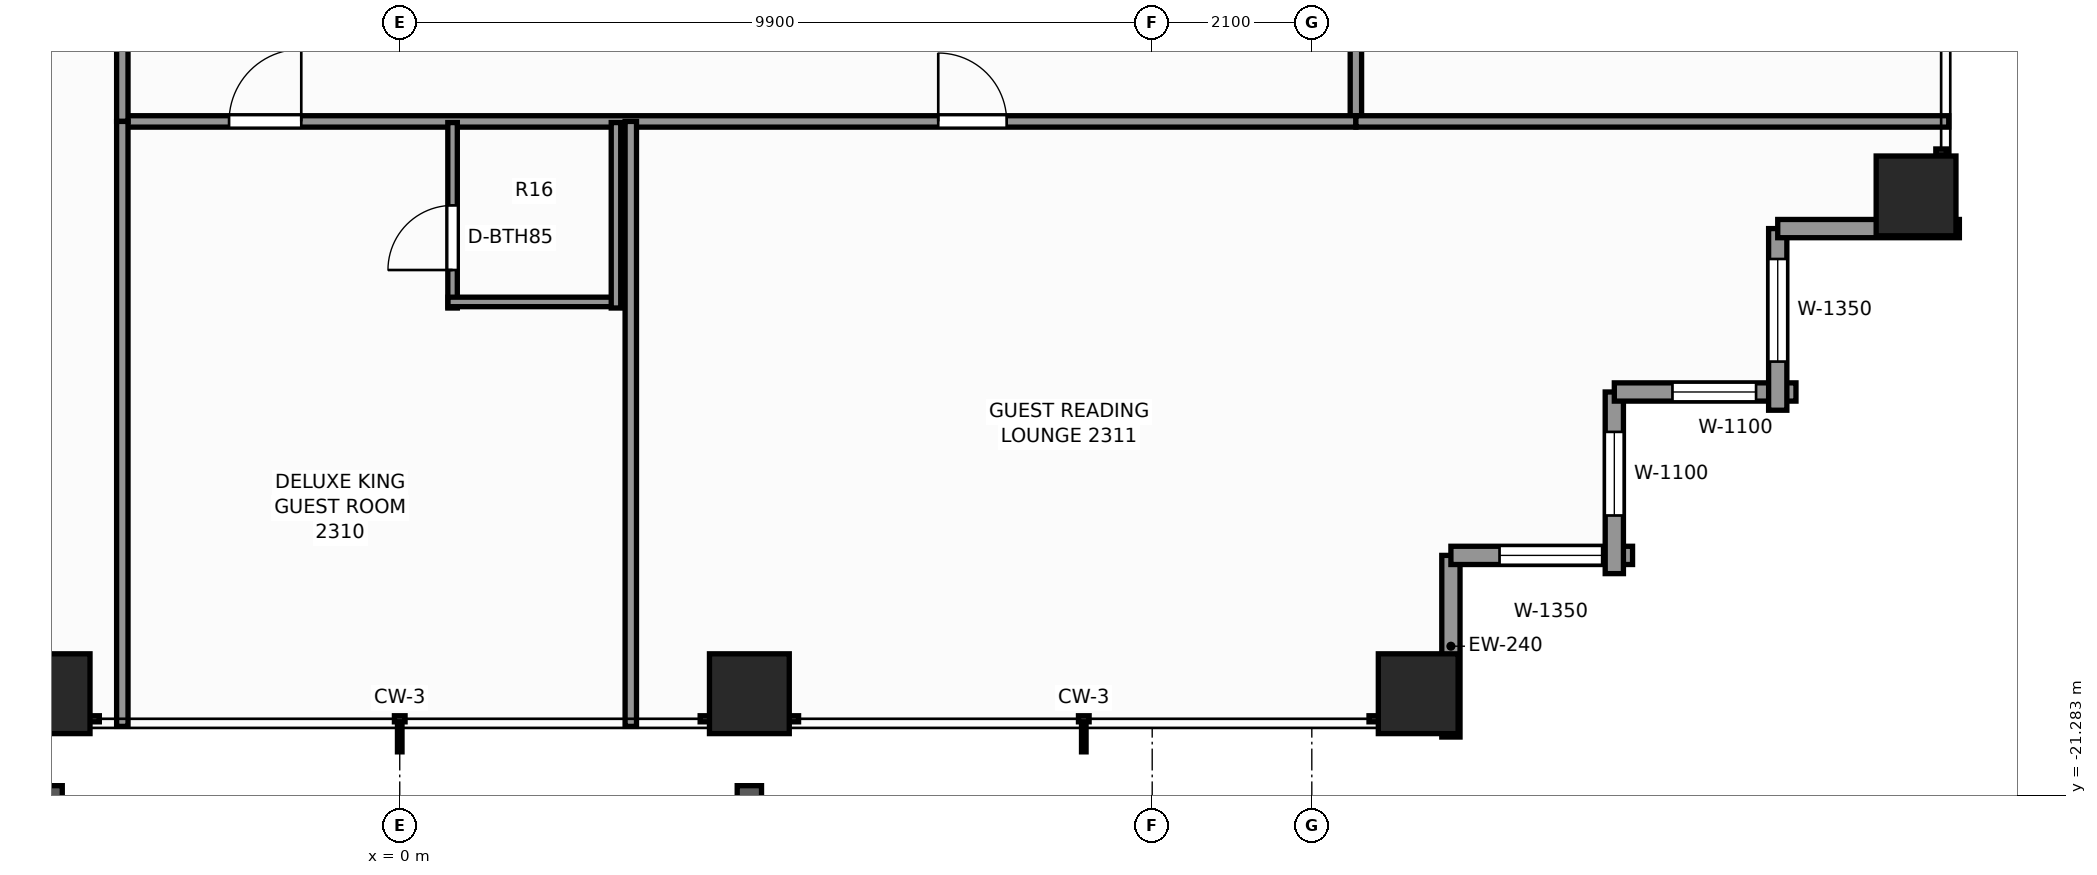
"""IFC4 building model, lengths in metres.
Left out: names, types, materials, properties, quantities, classifications, styles, units other than length and angle.
Written with IfcOpenShell. Run it as: python <this file> out.ifc"""

import sys

from ifc_helpers import new_model, si_unit, direction, frame, frame_2d, origin, origin_2d, place, context, subcontext, project, spatial, rectangle, extrude, element, fill, save


model = new_model("IFC4")
c1 = context("Model", 3, precision=1e-05, world=origin(), true_north=direction((0.0, 1.0)))
c2 = subcontext(c1, "Body", "Model", "MODEL_VIEW")
j1 = project(units=[si_unit("LENGTHUNIT", "METRE"), si_unit("PLANEANGLEUNIT", "RADIAN")], contexts=[c1])
p1 = place(None, origin())
s1 = spatial("IfcSite", under=j1, at=p1, CompositionType="ELEMENT")
p2 = place(p1, origin())
s2 = spatial("IfcBuilding", under=s1, at=p2, CompositionType="ELEMENT")
p3 = place(p2, frame((0.0, 0.0, 82.1)))
s3 = spatial("IfcBuildingStorey", under=s2, at=p3, CompositionType="ELEMENT", Elevation=82.1)
for number, where, z_axis, x_axis in (
    (1, (-4.6, -19.95, 0.0), (0.0, 0.0, 1.0), (1.0, 0.0, 0.0)),
    (2, (4.6, -19.95, 0.0), (0.0, 0.0, 1.0), (1.0, 0.0, 0.0)),
    (3, (13.4, -19.95, 0.0), (0.0, 0.0, 1.0), (1.0, 0.0, 0.0)),
    (4, (19.95, -13.4, 0.0), (0.0, 0.0, 1.0), (1.0, 0.0, 0.0)),
):
    element("IfcColumn", number, at=place(p3, frame(where, z_axis=z_axis, x_axis=x_axis)), inside=s3, PredefinedType="COLUMN", context=c2, shape_type="SweptSolid", body=[
        extrude(rectangle(XDim=1.05, YDim=1.05, at=origin_2d()), origin(), (0.0, 0.0, 1.0), 3.3),
    ])
p4 = place(p3, frame((13.83, -18.13, 0.0), z_axis=(0.0, 0.0, 1.0), x_axis=(0.0, -1.0, 0.0)))
e5 = element("IfcWall", 5, at=p4, inside=s3, PredefinedType="STANDARD", context=c2, shape_type="SweptSolid", body=[
    extrude(rectangle(XDim=2.39, YDim=0.24, at=frame_2d((1.195, 0.0))), origin(), (0.0, 0.0, 1.0), 2.459),
])
p5 = place(p3, frame((16.22, -18.13, 0.0), z_axis=(0.0, 0.0, 1.0), x_axis=(-1.0, 0.0, 0.0)))
e6 = element("IfcWall", 6, at=p5, inside=s3, PredefinedType="STANDARD", context=c2, shape_type="SweptSolid", body=[
    extrude(rectangle(XDim=2.39, YDim=0.24, at=frame_2d((1.195, 0.0))), origin(), (0.0, 0.0, 1.0), 2.459),
])
p6 = place(p5, frame((0.4, 0.0, 0.65)))
e7 = element("IfcOpeningElement", 7, at=p6, cuts=e6, PredefinedType="OPENING", context=c2, shape_type="SweptSolid", body=[
    extrude(rectangle(XDim=1.35, YDim=1.55, at=frame_2d((0.675, 0.775))), frame((0.0, 0.13, 0.0), z_axis=(0.0, -1.0, 0.0), x_axis=(1.0, 0.0, 0.0)), (0.0, 0.0, 1.0), 0.26),
])
p7 = place(p3, frame((15.98, -15.98, 0.0), z_axis=(0.0, 0.0, 1.0), x_axis=(0.0, -1.0, 0.0)))
e8 = element("IfcWall", 8, at=p7, inside=s3, PredefinedType="STANDARD", context=c2, shape_type="SweptSolid", body=[
    extrude(rectangle(XDim=2.39, YDim=0.24, at=frame_2d((1.195, 0.0))), origin(), (0.0, 0.0, 1.0), 2.459),
])
p8 = place(p7, frame((0.525, 0.0, 0.65)))
e9 = element("IfcOpeningElement", 9, at=p8, cuts=e8, PredefinedType="OPENING", context=c2, shape_type="SweptSolid", body=[
    extrude(rectangle(XDim=1.1, YDim=1.45, at=frame_2d((0.55, 0.725))), frame((0.0, 0.13, 0.0), z_axis=(0.0, -1.0, 0.0), x_axis=(1.0, 0.0, 0.0)), (0.0, 0.0, 1.0), 0.26),
])
p9 = place(p3, frame((18.37, -15.98, 0.0), z_axis=(0.0, 0.0, 1.0), x_axis=(-1.0, 0.0, 0.0)))
e10 = element("IfcWall", 10, at=p9, inside=s3, PredefinedType="STANDARD", context=c2, shape_type="SweptSolid", body=[
    extrude(rectangle(XDim=2.39, YDim=0.24, at=frame_2d((1.195, 0.0))), origin(), (0.0, 0.0, 1.0), 2.459),
])
p10 = place(p9, frame((0.525, 0.0, 0.65)))
e11 = element("IfcOpeningElement", 11, at=p10, cuts=e10, PredefinedType="OPENING", context=c2, shape_type="SweptSolid", body=[
    extrude(rectangle(XDim=1.1, YDim=1.45, at=frame_2d((0.55, 0.725))), frame((0.0, 0.13, 0.0), z_axis=(0.0, -1.0, 0.0), x_axis=(1.0, 0.0, 0.0)), (0.0, 0.0, 1.0), 0.26),
])
p11 = place(p3, frame((18.13, -13.83, 0.0), z_axis=(0.0, 0.0, 1.0), x_axis=(0.0, -1.0, 0.0)))
e12 = element("IfcWall", 12, at=p11, inside=s3, PredefinedType="STANDARD", context=c2, shape_type="SweptSolid", body=[
    extrude(rectangle(XDim=2.39, YDim=0.24, at=frame_2d((1.195, 0.0))), origin(), (0.0, 0.0, 1.0), 2.459),
])
p12 = place(p11, frame((0.4, 0.0, 0.65)))
e13 = element("IfcOpeningElement", 13, at=p12, cuts=e12, PredefinedType="OPENING", context=c2, shape_type="SweptSolid", body=[
    extrude(rectangle(XDim=1.35, YDim=1.55, at=frame_2d((0.675, 0.775))), frame((0.0, 0.13, 0.0), z_axis=(0.0, -1.0, 0.0), x_axis=(1.0, 0.0, 0.0)), (0.0, 0.0, 1.0), 0.26),
])
p13 = place(p3, frame((20.52, -13.83, 0.0), z_axis=(0.0, 0.0, 1.0), x_axis=(-1.0, 0.0, 0.0)))
e14 = element("IfcWall", 14, at=p13, inside=s3, PredefinedType="STANDARD", context=c2, shape_type="SweptSolid", body=[
    extrude(rectangle(XDim=2.39, YDim=0.24, at=frame_2d((1.195, 0.0))), origin(), (0.0, 0.0, 1.0), 2.459),
])
p14 = place(p3, frame((12.58, -12.42, 0.0), z_axis=(0.0, 0.0, 1.0), x_axis=(0.0, 1.0, 0.0)))
e15 = element("IfcWall", 15, at=p14, inside=s3, PredefinedType="PARTITIONING", context=c2, shape_type="SweptSolid", body=[
    extrude(rectangle(XDim=24.84, YDim=0.15, at=frame_2d((12.42, 0.0))), origin(), (0.0, 0.0, 1.0), 2.292),
])
p15 = place(p14, frame((4.41, 0.0, 0.0)))
e16 = element("IfcOpeningElement", 16, at=p15, cuts=e15, PredefinedType="OPENING", context=c2, shape_type="SweptSolid", body=[
    extrude(rectangle(XDim=0.95, YDim=2.06, at=frame_2d((0.475, 1.03))), frame((0.0, 0.085, 0.0), z_axis=(0.0, -1.0, 0.0), x_axis=(1.0, 0.0, 0.0)), (0.0, 0.0, 1.0), 0.17),
])
p16 = place(p14, frame((19.505, 0.0, 0.0)))
e17 = element("IfcOpeningElement", 17, at=p16, cuts=e15, PredefinedType="OPENING", context=c2, shape_type="SweptSolid", body=[
    extrude(rectangle(XDim=0.9, YDim=2.06, at=frame_2d((0.45, 1.03))), frame((0.0, 0.085, 0.0), z_axis=(0.0, -1.0, 0.0), x_axis=(1.0, 0.0, 0.0)), (0.0, 0.0, 1.0), 0.17),
])
p17 = place(p3, frame((-3.65, -12.42, 0.0), z_axis=(0.0, 0.0, 1.0), x_axis=(1.0, 0.0, 0.0)))
e18 = element("IfcWall", 18, at=p17, inside=s3, PredefinedType="PARTITIONING", context=c2, shape_type="SweptSolid", body=[
    extrude(rectangle(XDim=16.23, YDim=0.15, at=frame_2d((8.115, 0.0))), origin(), (0.0, 0.0, 1.0), 2.292),
])
p18 = place(p17, frame((1.405, 0.0, 0.0)))
e19 = element("IfcOpeningElement", 19, at=p18, cuts=e18, PredefinedType="OPENING", context=c2, shape_type="SweptSolid", body=[
    extrude(rectangle(XDim=0.95, YDim=2.06, at=frame_2d((0.475, 1.03))), frame((0.0, 0.085, 0.0), z_axis=(0.0, -1.0, 0.0), x_axis=(1.0, 0.0, 0.0)), (0.0, 0.0, 1.0), 0.17),
])
p19 = place(p17, frame((10.735, 0.0, 0.0)))
e20 = element("IfcOpeningElement", 20, at=p19, cuts=e18, PredefinedType="OPENING", context=c2, shape_type="SweptSolid", body=[
    extrude(rectangle(XDim=0.9, YDim=2.06, at=frame_2d((0.45, 1.03))), frame((0.0, 0.085, 0.0), z_axis=(0.0, -1.0, 0.0), x_axis=(1.0, 0.0, 0.0)), (0.0, 0.0, 1.0), 0.17),
])
p20 = place(p3, frame((-3.65, -12.42, 0.0), z_axis=(0.0, 0.0, 1.0), x_axis=(0.0, 1.0, 0.0)))
e21 = element("IfcWall", 21, at=p20, inside=s3, PredefinedType="PARTITIONING", context=c2, shape_type="SweptSolid", body=[
    extrude(rectangle(XDim=2.52, YDim=0.15, at=frame_2d((1.26, 0.0))), origin(), (0.0, 0.0, 1.0), 3.08),
])
p21 = place(p3, frame((12.58, -12.42, 0.0), z_axis=(0.0, 0.0, 1.0), x_axis=(1.0, 0.0, 0.0)))
e22 = element("IfcWall", 22, at=p21, inside=s3, PredefinedType="PARTITIONING", context=c2, shape_type="SweptSolid", body=[
    extrude(rectangle(XDim=7.8, YDim=0.15, at=frame_2d((3.9, 0.0))), origin(), (0.0, 0.0, 1.0), 2.292),
])
p22 = place(p3, frame((-3.65, -20.38, 0.0), z_axis=(0.0, 0.0, 1.0), x_axis=(0.0, 1.0, 0.0)))
e23 = element("IfcWall", 23, at=p22, inside=s3, PredefinedType="PARTITIONING", context=c2, shape_type="SweptSolid", body=[
    extrude(rectangle(XDim=7.96, YDim=0.15, at=frame_2d((3.98, 0.0))), origin(), (0.0, 0.0, 1.0), 2.449),
])
p23 = place(p3, frame((3.04, -20.38, 0.0), z_axis=(0.0, 0.0, 1.0), x_axis=(0.0, 1.0, 0.0)))
e24 = element("IfcWall", 24, at=p23, inside=s3, PredefinedType="PARTITIONING", context=c2, shape_type="SweptSolid", body=[
    extrude(rectangle(XDim=7.96, YDim=0.15, at=frame_2d((3.98, 0.0))), origin(), (0.0, 0.0, 1.0), 2.369),
])
p24 = place(p3, frame((0.695, -14.875, 0.0), z_axis=(0.0, 0.0, 1.0), x_axis=(0.0, 1.0, 0.0)))
e25 = element("IfcWall", 25, at=p24, inside=s3, PredefinedType="PARTITIONING", context=c2, shape_type="SweptSolid", body=[
    extrude(rectangle(XDim=2.44, YDim=0.125, at=frame_2d((1.22, 0.0))), origin(), (0.0, 0.0, 1.0), 3.08),
])
p25 = place(p24, frame((0.5, 0.0, 0.0)))
e26 = element("IfcOpeningElement", 26, at=p25, cuts=e25, PredefinedType="OPENING", context=c2, shape_type="SweptSolid", body=[
    extrude(rectangle(XDim=0.85, YDim=2.03, at=frame_2d((0.425, 1.015))), frame((0.0, 0.073, 0.0), z_axis=(0.0, -1.0, 0.0), x_axis=(1.0, 0.0, 0.0)), (0.0, 0.0, 1.0), 0.145),
])
p26 = place(p3, frame((0.635, -14.795, 0.0), z_axis=(0.0, 0.0, 1.0), x_axis=(1.0, 0.0, 0.0)))
e27 = element("IfcWall", 27, at=p26, inside=s3, PredefinedType="PARTITIONING", context=c2, shape_type="SweptSolid", body=[
    extrude(rectangle(XDim=2.27, YDim=0.125, at=frame_2d((1.135, 0.0))), origin(), (0.0, 0.0, 1.0), 3.08),
])
p27 = place(p3, frame((2.845, -14.875, 0.0), z_axis=(0.0, 0.0, 1.0), x_axis=(0.0, 1.0, 0.0)))
e28 = element("IfcWall", 28, at=p27, inside=s3, PredefinedType="PARTITIONING", context=c2, shape_type="SweptSolid", body=[
    extrude(rectangle(XDim=2.44, YDim=0.125, at=frame_2d((1.22, 0.0))), origin(), (0.0, 0.0, 1.0), 2.369),
])
p28 = place(p6, origin())
e29 = element("IfcWindow", 29, at=p28, inside=s3, PartitioningType="SINGLE_PANEL", PredefinedType="WINDOW", context=c2, shape_type="SweptSolid", body=[
    extrude(rectangle(XDim=1.35, YDim=1.55, at=frame_2d((0.675, 0.775))), frame((0.0, 0.03, 0.0), z_axis=(0.0, -1.0, 0.0), x_axis=(1.0, 0.0, 0.0)), (0.0, 0.0, 1.0), 0.06),
])
fill(e7, e29)
p29 = place(p8, origin())
e30 = element("IfcWindow", 30, at=p29, inside=s3, PartitioningType="SINGLE_PANEL", PredefinedType="WINDOW", context=c2, shape_type="SweptSolid", body=[
    extrude(rectangle(XDim=1.1, YDim=1.45, at=frame_2d((0.55, 0.725))), frame((0.0, 0.03, 0.0), z_axis=(0.0, -1.0, 0.0), x_axis=(1.0, 0.0, 0.0)), (0.0, 0.0, 1.0), 0.06),
])
fill(e9, e30)
p30 = place(p10, origin())
e31 = element("IfcWindow", 31, at=p30, inside=s3, PartitioningType="SINGLE_PANEL", PredefinedType="WINDOW", context=c2, shape_type="SweptSolid", body=[
    extrude(rectangle(XDim=1.1, YDim=1.45, at=frame_2d((0.55, 0.725))), frame((0.0, 0.03, 0.0), z_axis=(0.0, -1.0, 0.0), x_axis=(1.0, 0.0, 0.0)), (0.0, 0.0, 1.0), 0.06),
])
fill(e11, e31)
p31 = place(p12, origin())
e32 = element("IfcWindow", 32, at=p31, inside=s3, PartitioningType="SINGLE_PANEL", PredefinedType="WINDOW", context=c2, shape_type="SweptSolid", body=[
    extrude(rectangle(XDim=1.35, YDim=1.55, at=frame_2d((0.675, 0.775))), frame((0.0, 0.03, 0.0), z_axis=(0.0, -1.0, 0.0), x_axis=(1.0, 0.0, 0.0)), (0.0, 0.0, 1.0), 0.06),
])
fill(e13, e32)
p32 = place(p25, origin())
e33 = element("IfcDoor", 33, at=p32, inside=s3, OperationType="SINGLE_SWING_LEFT", PredefinedType="DOOR", context=c2, shape_type="SweptSolid", body=[
    extrude(rectangle(XDim=0.85, YDim=2.03, at=frame_2d((0.425, 1.015))), frame((0.0, 0.025, 0.0), z_axis=(0.0, -1.0, 0.0), x_axis=(1.0, 0.0, 0.0)), (0.0, 0.0, 1.0), 0.05),
])
fill(e26, e33)
p33 = place(p18, origin())
e34 = element("IfcDoor", 34, at=p33, inside=s3, OperationType="SINGLE_SWING_RIGHT", PredefinedType="DOOR", context=c2, shape_type="SweptSolid", body=[
    extrude(rectangle(XDim=0.95, YDim=2.06, at=frame_2d((0.475, 1.03))), frame((0.0, 0.025, 0.0), z_axis=(0.0, -1.0, 0.0), x_axis=(1.0, 0.0, 0.0)), (0.0, 0.0, 1.0), 0.05),
])
fill(e19, e34)
p34 = place(p19, origin())
e35 = element("IfcDoor", 35, at=p34, inside=s3, OperationType="SINGLE_SWING_LEFT", PredefinedType="DOOR", context=c2, shape_type="SweptSolid", body=[
    extrude(rectangle(XDim=0.9, YDim=2.06, at=frame_2d((0.45, 1.03))), frame((0.0, 0.025, 0.0), z_axis=(0.0, -1.0, 0.0), x_axis=(1.0, 0.0, 0.0)), (0.0, 0.0, 1.0), 0.05),
])
fill(e20, e35)
save(model, sys.argv[1])
